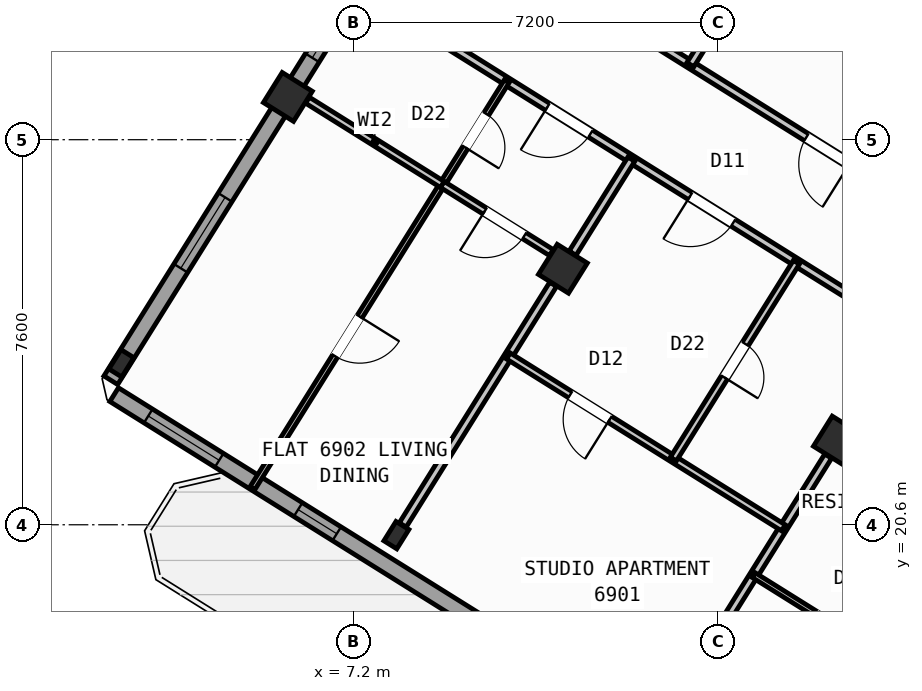
"""IFC4 building model, lengths in metres.
Left out: names, types, materials, properties, quantities, classifications, styles, units other than length and angle.
Written with IfcOpenShell. Run it as: python <this file> out.ifc"""

import sys

from ifc_helpers import new_model, si_unit, direction, frame, frame_2d, origin, origin_2d, place, context, subcontext, project, spatial, rectangle, hollow_rectangle, i_section, extrude, source, transform, mapped, element, fill, save


model = new_model("IFC4")
c1 = context("Model", 3, precision=1e-05, world=origin(), true_north=direction((0.0, 1.0)))
c2 = subcontext(c1, "Body", "Model", "MODEL_VIEW")
j1 = project(units=[si_unit("LENGTHUNIT", "METRE"), si_unit("PLANEANGLEUNIT", "RADIAN")], contexts=[c1])
p1 = place(None, origin())
s1 = spatial("IfcSite", under=j1, at=p1, CompositionType="ELEMENT")
p2 = place(p1, origin())
s2 = spatial("IfcBuilding", under=s1, at=p2, CompositionType="ELEMENT")
p3 = place(p2, frame((0.0, 0.0, 273.6)))
s3 = spatial("IfcBuildingStorey", under=s2, at=p3, CompositionType="ELEMENT", Elevation=273.6)
m1 = source(origin(), c2, "Body", "SweptSolid", [
    extrude(hollow_rectangle(XDim=0.7, YDim=0.7, WallThickness=0.028, at=origin_2d()), origin(), (0.0, 0.0, 1.0), 3.6),
])
for number, where, z_axis, x_axis in (
    (1, (16.764, 22.261, 0.0), (0.0, 0.0, 1.0), (-0.848, 0.53, 0.0)),
    (2, (11.336, 25.653, 0.0), (0.0, 0.0, 1.0), (-0.848, 0.53, 0.0)),
):
    element("IfcColumn", number, at=place(p3, frame(where, z_axis=z_axis, x_axis=x_axis)), inside=s3, PredefinedType="COLUMN", context=c2, shape_type="MappedRepresentation", body=[
        mapped(m1, transform((0.0, 0.0, 0.0), scale=1.0)),
    ])
m2 = source(origin(), c2, "Body", "SweptSolid", [
    extrude(i_section(OverallWidth=0.3, OverallDepth=0.45, WebThickness=0.014, FlangeThickness=0.026, at=origin_2d()), origin(), (0.0, 0.0, 1.0), 3.6),
])
p4 = place(p3, frame((8.051, 20.395, 0.0), z_axis=(0.0, 0.0, 1.0), x_axis=(-0.848048096156, 0.529919264233, 0.0)))
e3 = element("IfcColumn", 3, at=p4, inside=s3, PredefinedType="COLUMN", context=c2, shape_type="MappedRepresentation", body=[
    mapped(m2, transform((0.0, 0.0, 0.0), scale=1.0)),
])
p5 = place(p3, frame((5.909, 29.044, 0.0), z_axis=(0.0, 0.0, 1.0), x_axis=(-0.848048096156, 0.529919264233, 0.0)))
e4 = element("IfcColumn", 4, at=p5, inside=s3, PredefinedType="COLUMN", context=c2, shape_type="MappedRepresentation", body=[
    mapped(m1, transform((0.0, 0.0, 0.0), scale=1.0)),
])
p6 = place(p3, frame((2.623, 23.786, 0.0), z_axis=(0.0, 0.0, 1.0), x_axis=(-0.848048096156, 0.529919264233, 0.0)))
e5 = element("IfcColumn", 5, at=p6, inside=s3, PredefinedType="COLUMN", context=c2, shape_type="MappedRepresentation", body=[
    mapped(m2, transform((0.0, 0.0, 0.0), scale=1.0)),
])
p7 = place(p3, frame((29.268, 6.429, 0.0), z_axis=(0.0, 0.0, 1.0), x_axis=(-0.848049971435, 0.529916263149, 0.0)))
e6 = element("IfcWall", 6, at=p7, inside=s3, PredefinedType="STANDARD", context=c2, shape_type="SweptSolid", body=[
    extrude(rectangle(XDim=31.588, YDim=0.32, at=frame_2d((15.794, 0.0))), origin(), (0.0, 0.0, 1.0), 3.35),
])
p8 = place(p7, frame((16.362, 0.0, 0.0)))
e7 = element("IfcOpeningElement", 7, at=p8, cuts=e6, PredefinedType="OPENING", context=c2, shape_type="SweptSolid", body=[
    extrude(rectangle(XDim=1.2, YDim=2.15, at=frame_2d((0.6, 1.075))), frame((0.0, 0.17, 0.0), z_axis=(0.0, -1.0, 0.0), x_axis=(1.0, 0.0, 0.0)), (0.0, 0.0, 1.0), 0.34),
])
p9 = place(p7, frame((3.859, 0.0, 0.9)))
e8 = element("IfcOpeningElement", 8, at=p9, cuts=e6, PredefinedType="OPENING", context=c2, shape_type="SweptSolid", body=[
    extrude(rectangle(XDim=1.65, YDim=1.45, at=frame_2d((0.825, 0.725))), frame((0.0, 0.17, 0.0), z_axis=(0.0, -1.0, 0.0), x_axis=(1.0, 0.0, 0.0)), (0.0, 0.0, 1.0), 0.34),
])
p10 = place(p7, frame((10.519, 0.0, 0.9)))
e9 = element("IfcOpeningElement", 9, at=p10, cuts=e6, PredefinedType="OPENING", context=c2, shape_type="SweptSolid", body=[
    extrude(rectangle(XDim=1.65, YDim=1.45, at=frame_2d((0.825, 0.725))), frame((0.0, 0.17, 0.0), z_axis=(0.0, -1.0, 0.0), x_axis=(1.0, 0.0, 0.0)), (0.0, 0.0, 1.0), 0.34),
])
p11 = place(p7, frame((21.219, 0.0, 0.95)))
e10 = element("IfcOpeningElement", 10, at=p11, cuts=e6, PredefinedType="OPENING", context=c2, shape_type="SweptSolid", body=[
    extrude(rectangle(XDim=1.95, YDim=1.35, at=frame_2d((0.975, 0.675))), frame((0.0, 0.17, 0.0), z_axis=(0.0, -1.0, 0.0), x_axis=(1.0, 0.0, 0.0)), (0.0, 0.0, 1.0), 0.34),
])
p12 = place(p7, frame((26.406, 0.0, 1.0)))
e11 = element("IfcOpeningElement", 11, at=p12, cuts=e6, PredefinedType="OPENING", context=c2, shape_type="SweptSolid", body=[
    extrude(rectangle(XDim=0.9, YDim=1.25, at=frame_2d((0.45, 0.625))), frame((0.0, 0.17, 0.0), z_axis=(0.0, -1.0, 0.0), x_axis=(1.0, 0.0, 0.0)), (0.0, 0.0, 1.0), 0.34),
])
p13 = place(p7, frame((29.143, 0.0, 0.9)))
e12 = element("IfcOpeningElement", 12, at=p13, cuts=e6, PredefinedType="OPENING", context=c2, shape_type="SweptSolid", body=[
    extrude(rectangle(XDim=1.65, YDim=1.45, at=frame_2d((0.825, 0.725))), frame((0.0, 0.17, 0.0), z_axis=(0.0, -1.0, 0.0), x_axis=(1.0, 0.0, 0.0)), (0.0, 0.0, 1.0), 0.34),
])
p14 = place(p3, frame((2.415, 23.452, 0.0), z_axis=(0.0, 0.0, 1.0), x_axis=(0.52991049553, 0.848053575387, 0.0)))
e13 = element("IfcWall", 13, at=p14, inside=s3, PredefinedType="STANDARD", context=c2, shape_type="SweptSolid", body=[
    extrude(rectangle(XDim=21.587, YDim=0.32, at=frame_2d((10.794, 0.0))), origin(), (0.0, 0.0, 1.0), 2.875),
])
p15 = place(p14, frame((2.606, 0.0, 0.9)))
e14 = element("IfcOpeningElement", 14, at=p15, cuts=e13, PredefinedType="OPENING", context=c2, shape_type="SweptSolid", body=[
    extrude(rectangle(XDim=1.65, YDim=1.45, at=frame_2d((0.825, 0.725))), frame((0.0, 0.17, 0.0), z_axis=(0.0, -1.0, 0.0), x_axis=(1.0, 0.0, 0.0)), (0.0, 0.0, 1.0), 0.34),
])
p16 = place(p14, frame((7.504, 0.0, 1.0)))
e15 = element("IfcOpeningElement", 15, at=p16, cuts=e13, PredefinedType="OPENING", context=c2, shape_type="SweptSolid", body=[
    extrude(rectangle(XDim=0.9, YDim=1.25, at=frame_2d((0.45, 0.625))), frame((0.0, 0.17, 0.0), z_axis=(0.0, -1.0, 0.0), x_axis=(1.0, 0.0, 0.0)), (0.0, 0.0, 1.0), 0.34),
])
p17 = place(p14, frame((12.084, 0.0, 1.0)))
e16 = element("IfcOpeningElement", 16, at=p17, cuts=e13, PredefinedType="OPENING", context=c2, shape_type="SweptSolid", body=[
    extrude(rectangle(XDim=0.9, YDim=1.25, at=frame_2d((0.45, 0.625))), frame((0.0, 0.17, 0.0), z_axis=(0.0, -1.0, 0.0), x_axis=(1.0, 0.0, 0.0)), (0.0, 0.0, 1.0), 0.34),
])
p18 = place(p14, frame((15.619, 0.0, 1.0)))
e17 = element("IfcOpeningElement", 17, at=p18, cuts=e13, PredefinedType="OPENING", context=c2, shape_type="SweptSolid", body=[
    extrude(rectangle(XDim=0.9, YDim=1.25, at=frame_2d((0.45, 0.625))), frame((0.0, 0.17, 0.0), z_axis=(0.0, -1.0, 0.0), x_axis=(1.0, 0.0, 0.0)), (0.0, 0.0, 1.0), 0.34),
])
p19 = place(p14, frame((18.569, 0.0, 1.0)))
e18 = element("IfcOpeningElement", 18, at=p19, cuts=e13, PredefinedType="OPENING", context=c2, shape_type="SweptSolid", body=[
    extrude(rectangle(XDim=0.9, YDim=1.25, at=frame_2d((0.45, 0.625))), frame((0.0, 0.17, 0.0), z_axis=(0.0, -1.0, 0.0), x_axis=(1.0, 0.0, 0.0)), (0.0, 0.0, 1.0), 0.34),
])
p20 = place(p3, frame((14.138, 41.825, 0.0), z_axis=(0.0, 0.0, 1.0), x_axis=(0.848046498049, -0.529921821731, 0.0)))
e19 = element("IfcWall", 19, at=p20, inside=s3, PredefinedType="STANDARD", context=c2, shape_type="SweptSolid", body=[
    extrude(rectangle(XDim=31.588, YDim=0.32, at=frame_2d((15.794, 0.0))), origin(), (0.0, 0.0, 1.0), 3.35),
])
p21 = place(p20, frame((3.46, 0.0, 0.0)))
e20 = element("IfcOpeningElement", 20, at=p21, cuts=e19, PredefinedType="OPENING", context=c2, shape_type="SweptSolid", body=[
    extrude(rectangle(XDim=1.05, YDim=2.15, at=frame_2d((0.525, 1.075))), frame((0.0, 0.17, 0.0), z_axis=(0.0, -1.0, 0.0), x_axis=(1.0, 0.0, 0.0)), (0.0, 0.0, 1.0), 0.34),
])
p22 = place(p20, frame((0.831, 0.0, 1.0)))
e21 = element("IfcOpeningElement", 21, at=p22, cuts=e19, PredefinedType="OPENING", context=c2, shape_type="SweptSolid", body=[
    extrude(rectangle(XDim=0.9, YDim=1.25, at=frame_2d((0.45, 0.625))), frame((0.0, 0.17, 0.0), z_axis=(0.0, -1.0, 0.0), x_axis=(1.0, 0.0, 0.0)), (0.0, 0.0, 1.0), 0.34),
])
p23 = place(p20, frame((8.719, 0.0, 0.9)))
e22 = element("IfcOpeningElement", 22, at=p23, cuts=e19, PredefinedType="OPENING", context=c2, shape_type="SweptSolid", body=[
    extrude(rectangle(XDim=1.35, YDim=1.45, at=frame_2d((0.675, 0.725))), frame((0.0, 0.17, 0.0), z_axis=(0.0, -1.0, 0.0), x_axis=(1.0, 0.0, 0.0)), (0.0, 0.0, 1.0), 0.34),
])
p24 = place(p20, frame((13.599, 0.0, 0.95)))
e23 = element("IfcOpeningElement", 23, at=p24, cuts=e19, PredefinedType="OPENING", context=c2, shape_type="SweptSolid", body=[
    extrude(rectangle(XDim=1.95, YDim=1.35, at=frame_2d((0.975, 0.675))), frame((0.0, 0.17, 0.0), z_axis=(0.0, -1.0, 0.0), x_axis=(1.0, 0.0, 0.0)), (0.0, 0.0, 1.0), 0.34),
])
p25 = place(p20, frame((17.154, 0.0, 1.0)))
e24 = element("IfcOpeningElement", 24, at=p25, cuts=e19, PredefinedType="OPENING", context=c2, shape_type="SweptSolid", body=[
    extrude(rectangle(XDim=0.9, YDim=1.25, at=frame_2d((0.45, 0.625))), frame((0.0, 0.17, 0.0), z_axis=(0.0, -1.0, 0.0), x_axis=(1.0, 0.0, 0.0)), (0.0, 0.0, 1.0), 0.34),
])
p26 = place(p20, frame((21.719, 0.0, 0.9)))
e25 = element("IfcOpeningElement", 25, at=p26, cuts=e19, PredefinedType="OPENING", context=c2, shape_type="SweptSolid", body=[
    extrude(rectangle(XDim=1.65, YDim=1.45, at=frame_2d((0.825, 0.725))), frame((0.0, 0.17, 0.0), z_axis=(0.0, -1.0, 0.0), x_axis=(1.0, 0.0, 0.0)), (0.0, 0.0, 1.0), 0.34),
])
p27 = place(p20, frame((27.419, 0.0, 0.9)))
e26 = element("IfcOpeningElement", 26, at=p27, cuts=e19, PredefinedType="OPENING", context=c2, shape_type="SweptSolid", body=[
    extrude(rectangle(XDim=1.65, YDim=1.45, at=frame_2d((0.825, 0.725))), frame((0.0, 0.17, 0.0), z_axis=(0.0, -1.0, 0.0), x_axis=(1.0, 0.0, 0.0)), (0.0, 0.0, 1.0), 0.34),
])
p28 = place(p3, frame((21.329, 22.416, 0.0), z_axis=(0.0, 0.0, 1.0), x_axis=(-0.529920220799, -0.848047498427, 0.0)))
e27 = element("IfcWall", 27, at=p28, inside=s3, PredefinedType="PARTITIONING", context=c2, shape_type="SweptSolid", body=[
    extrude(rectangle(XDim=9.2, YDim=0.16, at=frame_2d((4.6, 0.0))), origin(), (0.0, 0.0, 1.0), 3.34),
])
p29 = place(p3, frame((22.495, 24.281, 0.0), z_axis=(0.0, 0.0, 1.0), x_axis=(-0.848052408131, 0.529912363569, 0.0)))
e28 = element("IfcWall", 28, at=p29, inside=s3, PredefinedType="PARTITIONING", context=c2, shape_type="SweptSolid", body=[
    extrude(rectangle(XDim=16.73, YDim=0.16, at=frame_2d((8.365, 0.0))), origin(), (0.0, 0.0, 1.0), 3.34),
])
p30 = place(p29, frame((2.22, 0.0, 0.0)))
e29 = element("IfcOpeningElement", 29, at=p30, cuts=e28, PredefinedType="OPENING", context=c2, shape_type="SweptSolid", body=[
    extrude(rectangle(XDim=0.86, YDim=2.05, at=frame_2d((0.43, 1.025))), frame((0.0, 0.09, 0.0), z_axis=(0.0, -1.0, 0.0), x_axis=(1.0, 0.0, 0.0)), (0.0, 0.0, 1.0), 0.18),
])
p31 = place(p29, frame((6.49, 0.0, 0.0)))
e30 = element("IfcOpeningElement", 30, at=p31, cuts=e28, PredefinedType="OPENING", context=c2, shape_type="SweptSolid", body=[
    extrude(rectangle(XDim=1.0, YDim=2.1, at=frame_2d((0.5, 1.05))), frame((0.0, 0.09, 0.0), z_axis=(0.0, -1.0, 0.0), x_axis=(1.0, 0.0, 0.0)), (0.0, 0.0, 1.0), 0.18),
])
p32 = place(p29, frame((14.76, 0.0, 0.0)))
e31 = element("IfcOpeningElement", 31, at=p32, cuts=e28, PredefinedType="OPENING", context=c2, shape_type="SweptSolid", body=[
    extrude(rectangle(XDim=1.0, YDim=2.1, at=frame_2d((0.5, 1.05))), frame((0.0, 0.09, 0.0), z_axis=(0.0, -1.0, 0.0), x_axis=(1.0, 0.0, 0.0)), (0.0, 0.0, 1.0), 0.18),
])
p33 = place(p3, frame((21.329, 22.416, 0.0), z_axis=(0.0, 0.0, 1.0), x_axis=(-0.848052408131, 0.529912363569, 0.0)))
e32 = element("IfcWall", 32, at=p33, inside=s3, PredefinedType="PARTITIONING", context=c2, shape_type="SweptSolid", body=[
    extrude(rectangle(XDim=16.73, YDim=0.16, at=frame_2d((8.365, 0.0))), origin(), (0.0, 0.0, 1.0), 3.34),
])
p34 = place(p33, frame((1.395, 0.0, 0.0)))
e33 = element("IfcOpeningElement", 33, at=p34, cuts=e32, PredefinedType="OPENING", context=c2, shape_type="SweptSolid", body=[
    extrude(rectangle(XDim=1.0, YDim=2.1, at=frame_2d((0.5, 1.05))), frame((0.0, 0.09, 0.0), z_axis=(0.0, -1.0, 0.0), x_axis=(1.0, 0.0, 0.0)), (0.0, 0.0, 1.0), 0.18),
])
p35 = place(p33, frame((7.82, 0.0, 0.0)))
e34 = element("IfcOpeningElement", 34, at=p35, cuts=e32, PredefinedType="OPENING", context=c2, shape_type="SweptSolid", body=[
    extrude(rectangle(XDim=1.0, YDim=2.1, at=frame_2d((0.5, 1.05))), frame((0.0, 0.09, 0.0), z_axis=(0.0, -1.0, 0.0), x_axis=(1.0, 0.0, 0.0)), (0.0, 0.0, 1.0), 0.18),
])
p36 = place(p33, frame((11.14, 0.0, 0.0)))
e35 = element("IfcOpeningElement", 35, at=p36, cuts=e32, PredefinedType="OPENING", context=c2, shape_type="SweptSolid", body=[
    extrude(rectangle(XDim=1.0, YDim=2.1, at=frame_2d((0.5, 1.05))), frame((0.0, 0.09, 0.0), z_axis=(0.0, -1.0, 0.0), x_axis=(1.0, 0.0, 0.0)), (0.0, 0.0, 1.0), 0.18),
])
p37 = place(p3, frame((16.572, 21.954, 0.0), z_axis=(0.0, 0.0, 1.0), x_axis=(-0.529904903214, -0.848057069748, 0.0)))
e36 = element("IfcWall", 36, at=p37, inside=s3, PredefinedType="PARTITIONING", context=c2, shape_type="SweptSolid", body=[
    extrude(rectangle(XDim=5.601, YDim=0.16, at=frame_2d((2.801, 0.0))), origin(), (0.0, 0.0, 1.0), 2.875),
])
p38 = place(p3, frame((18.318, 17.597, 0.0), z_axis=(0.0, 0.0, 1.0), x_axis=(-0.848059820872, 0.529900500304, 0.0)))
e37 = element("IfcWall", 37, at=p38, inside=s3, PredefinedType="PARTITIONING", context=c2, shape_type="SweptSolid", body=[
    extrude(rectangle(XDim=3.79, YDim=0.11, at=frame_2d((1.895, 0.0))), origin(), (0.0, 0.0, 1.0), 3.34),
])
p39 = place(p38, frame((1.435, 0.0, 0.0)))
e38 = element("IfcOpeningElement", 38, at=p39, cuts=e37, PredefinedType="OPENING", context=c2, shape_type="SweptSolid", body=[
    extrude(rectangle(XDim=0.92, YDim=2.08, at=frame_2d((0.46, 1.04))), frame((0.0, 0.065, 0.0), z_axis=(0.0, -1.0, 0.0), x_axis=(1.0, 0.0, 0.0)), (0.0, 0.0, 1.0), 0.13),
])
p40 = place(p3, frame((12.688, 27.815, 0.0), z_axis=(0.0, 0.0, 1.0), x_axis=(-0.52994879608, -0.848029641896, 0.0)))
e39 = element("IfcWall", 39, at=p40, inside=s3, PredefinedType="PARTITIONING", context=c2, shape_type="SweptSolid", body=[
    extrude(rectangle(XDim=2.188, YDim=0.16, at=frame_2d((1.094, 0.0))), origin(), (0.0, 0.0, 1.0), 2.875),
])
p41 = place(p3, frame((11.144, 25.346, 0.0), z_axis=(0.0, 0.0, 1.0), x_axis=(-0.529904903214, -0.848057069748, 0.0)))
e40 = element("IfcWall", 40, at=p41, inside=s3, PredefinedType="PARTITIONING", context=c2, shape_type="SweptSolid", body=[
    extrude(rectangle(XDim=5.601, YDim=0.16, at=frame_2d((2.801, 0.0))), origin(), (0.0, 0.0, 1.0), 2.875),
])
p42 = place(p3, frame((15.688, 20.54, 0.0), z_axis=(0.0, 0.0, 1.0), x_axis=(-0.848049732085, 0.529916646191, 0.0)))
e41 = element("IfcWall", 41, at=p42, inside=s3, PredefinedType="PLUMBINGWALL", context=c2, shape_type="SweptSolid", body=[
    extrude(rectangle(XDim=6.4, YDim=0.14, at=frame_2d((3.2, 0.0))), origin(), (0.0, 0.0, 1.0), 3.34),
])
p43 = place(p42, frame((4.04, 0.0, 0.0)))
e42 = element("IfcOpeningElement", 42, at=p43, cuts=e41, PredefinedType="OPENING", context=c2, shape_type="SweptSolid", body=[
    extrude(rectangle(XDim=0.92, YDim=2.08, at=frame_2d((0.46, 1.04))), frame((0.0, 0.08, 0.0), z_axis=(0.0, -1.0, 0.0), x_axis=(1.0, 0.0, 0.0)), (0.0, 0.0, 1.0), 0.16),
])
p44 = place(p3, frame((15.944, 25.781, 0.0), z_axis=(0.0, 0.0, 1.0), x_axis=(-0.529917480809, -0.848049210561, 0.0)))
e43 = element("IfcWall", 43, at=p44, inside=s3, PredefinedType="PLUMBINGWALL", context=c2, shape_type="SweptSolid", body=[
    extrude(rectangle(XDim=4.58, YDim=0.14, at=frame_2d((2.29, 0.0))), origin(), (0.0, 0.0, 1.0), 3.34),
])
p45 = place(p44, frame((1.9, 0.0, 0.0)))
e44 = element("IfcOpeningElement", 44, at=p45, cuts=e43, PredefinedType="OPENING", context=c2, shape_type="SweptSolid", body=[
    extrude(rectangle(XDim=0.78, YDim=2.05, at=frame_2d((0.39, 1.025))), frame((0.0, 0.08, 0.0), z_axis=(0.0, -1.0, 0.0), x_axis=(1.0, 0.0, 0.0)), (0.0, 0.0, 1.0), 0.16),
])
p46 = place(p3, frame((10.228, 29.352, 0.0), z_axis=(0.0, 0.0, 1.0), x_axis=(-0.529917830441, -0.848048992088, 0.0)))
e45 = element("IfcWall", 45, at=p46, inside=s3, PredefinedType="PARTITIONING", context=c2, shape_type="SweptSolid", body=[
    extrude(rectangle(XDim=9.47, YDim=0.11, at=frame_2d((4.735, 0.0))), origin(), (0.0, 0.0, 1.0), 3.34),
])
p47 = place(p46, frame((0.76, 0.0, 0.0)))
e46 = element("IfcOpeningElement", 46, at=p47, cuts=e45, PredefinedType="OPENING", context=c2, shape_type="SweptSolid", body=[
    extrude(rectangle(XDim=0.78, YDim=2.05, at=frame_2d((0.39, 1.025))), frame((0.0, 0.065, 0.0), z_axis=(0.0, -1.0, 0.0), x_axis=(1.0, 0.0, 0.0)), (0.0, 0.0, 1.0), 0.13),
])
p48 = place(p46, frame((5.475, 0.0, 0.0)))
e47 = element("IfcOpeningElement", 47, at=p48, cuts=e45, PredefinedType="OPENING", context=c2, shape_type="SweptSolid", body=[
    extrude(rectangle(XDim=0.92, YDim=2.08, at=frame_2d((0.46, 1.04))), frame((0.0, 0.065, 0.0), z_axis=(0.0, -1.0, 0.0), x_axis=(1.0, 0.0, 0.0)), (0.0, 0.0, 1.0), 0.13),
])
p49 = place(p3, frame((11.109, 25.972, 0.0), z_axis=(0.0, 0.0, 1.0), x_axis=(-0.848041534199, 0.529929765415, 0.0)))
e48 = element("IfcWall", 48, at=p49, inside=s3, PredefinedType="PLUMBINGWALL", context=c2, shape_type="SweptSolid", body=[
    extrude(rectangle(XDim=2.538, YDim=0.14, at=frame_2d((1.269, 0.0))), origin(), (0.0, 0.0, 1.0), 2.875),
])
p50 = place(p49, frame((0.628, 0.0, 0.0)))
e49 = element("IfcOpeningElement", 49, at=p50, cuts=e48, PredefinedType="OPENING", context=c2, shape_type="SweptSolid", body=[
    extrude(rectangle(XDim=0.92, YDim=2.08, at=frame_2d((0.46, 1.04))), frame((0.0, 0.08, 0.0), z_axis=(0.0, -1.0, 0.0), x_axis=(1.0, 0.0, 0.0)), (0.0, 0.0, 1.0), 0.16),
])
p51 = place(p3, frame((8.956, 27.317, 0.0), z_axis=(0.0, 0.0, 1.0), x_axis=(-0.848050751193, 0.529915015264, 0.0)))
e50 = element("IfcWall", 50, at=p51, inside=s3, PredefinedType="PLUMBINGWALL", context=c2, shape_type="SweptSolid", body=[
    extrude(rectangle(XDim=3.138, YDim=0.14, at=frame_2d((1.569, 0.0))), origin(), (0.0, 0.0, 1.0), 2.875),
])
p52 = place(p3, frame((15.013, 31.537, 0.0), z_axis=(0.0, 0.0, 1.0), x_axis=(-0.5299186965, -0.848048450915, 0.0)))
e51 = element("IfcWall", 51, at=p52, inside=s3, PredefinedType="PARTITIONING", context=c2, shape_type="SweptSolid", body=[
    extrude(rectangle(XDim=2.188, YDim=0.16, at=frame_2d((1.094, 0.0))), origin(), (0.0, 0.0, 1.0), 2.875),
])
m3 = source(origin(), c2, "Body", "SweptSolid", [
    extrude(rectangle(XDim=0.9, YDim=1.25, at=frame_2d((0.45, 0.625))), frame((0.0, 0.03, 0.0), z_axis=(0.0, -1.0, 0.0), x_axis=(1.0, 0.0, 0.0)), (0.0, 0.0, 1.0), 0.06),
])
p53 = place(p12, origin())
e52 = element("IfcWindow", 52, at=p53, inside=s3, PartitioningType="SINGLE_PANEL", PredefinedType="WINDOW", context=c2, shape_type="MappedRepresentation", body=[
    mapped(m3, transform((0.0, 0.0, 0.0), scale=1.0)),
])
fill(e11, e52)
m4 = source(origin(), c2, "Body", "SweptSolid", [
    extrude(rectangle(XDim=1.65, YDim=1.45, at=frame_2d((0.825, 0.725))), frame((0.0, 0.03, 0.0), z_axis=(0.0, -1.0, 0.0), x_axis=(1.0, 0.0, 0.0)), (0.0, 0.0, 1.0), 0.06),
])
p54 = place(p13, origin())
e53 = element("IfcWindow", 53, at=p54, inside=s3, PartitioningType="SINGLE_PANEL", PredefinedType="WINDOW", context=c2, shape_type="MappedRepresentation", body=[
    mapped(m4, transform((0.0, 0.0, 0.0), scale=1.0)),
])
fill(e12, e53)
p55 = place(p15, origin())
e54 = element("IfcWindow", 54, at=p55, inside=s3, PartitioningType="SINGLE_PANEL", PredefinedType="WINDOW", context=c2, shape_type="MappedRepresentation", body=[
    mapped(m4, transform((0.0, 0.0, 0.0), scale=1.0)),
])
fill(e14, e54)
p56 = place(p16, origin())
e55 = element("IfcWindow", 55, at=p56, inside=s3, PartitioningType="SINGLE_PANEL", PredefinedType="WINDOW", context=c2, shape_type="MappedRepresentation", body=[
    mapped(m3, transform((0.0, 0.0, 0.0), scale=1.0)),
])
fill(e15, e55)
m5 = source(origin(), c2, "Body", "SweptSolid", [
    extrude(rectangle(XDim=1.0, YDim=2.1, at=frame_2d((0.5, 1.05))), frame((0.0, 0.025, 0.0), z_axis=(0.0, -1.0, 0.0), x_axis=(1.0, 0.0, 0.0)), (0.0, 0.0, 1.0), 0.05),
])
p57 = place(p35, origin())
e56 = element("IfcDoor", 56, at=p57, inside=s3, OperationType="SINGLE_SWING_RIGHT", PredefinedType="DOOR", context=c2, shape_type="MappedRepresentation", body=[
    mapped(m5, transform((0.0, 0.0, 0.0), scale=1.0)),
])
fill(e34, e56)
m6 = source(origin(), c2, "Body", "SweptSolid", [
    extrude(rectangle(XDim=0.92, YDim=2.08, at=frame_2d((0.46, 1.04))), frame((0.0, 0.025, 0.0), z_axis=(0.0, -1.0, 0.0), x_axis=(1.0, 0.0, 0.0)), (0.0, 0.0, 1.0), 0.05),
])
p58 = place(p43, origin())
e57 = element("IfcDoor", 57, at=p58, inside=s3, OperationType="SINGLE_SWING_LEFT", PredefinedType="DOOR", context=c2, shape_type="MappedRepresentation", body=[
    mapped(m6, transform((0.0, 0.0, 0.0), scale=1.0)),
])
fill(e42, e57)
m7 = source(origin(), c2, "Body", "SweptSolid", [
    extrude(rectangle(XDim=0.78, YDim=2.05, at=frame_2d((0.39, 1.025))), frame((0.0, 0.025, 0.0), z_axis=(0.0, -1.0, 0.0), x_axis=(1.0, 0.0, 0.0)), (0.0, 0.0, 1.0), 0.05),
])
p59 = place(p45, origin())
e58 = element("IfcDoor", 58, at=p59, inside=s3, OperationType="SINGLE_SWING_RIGHT", PredefinedType="DOOR", context=c2, shape_type="MappedRepresentation", body=[
    mapped(m7, transform((0.0, 0.0, 0.0), scale=1.0)),
])
fill(e44, e58)
p60 = place(p36, origin())
e59 = element("IfcDoor", 59, at=p60, inside=s3, OperationType="SINGLE_SWING_RIGHT", PredefinedType="DOOR", context=c2, shape_type="MappedRepresentation", body=[
    mapped(m5, transform((0.0, 0.0, 0.0), scale=1.0)),
])
fill(e35, e59)
p61 = place(p50, origin())
e60 = element("IfcDoor", 60, at=p61, inside=s3, OperationType="SINGLE_SWING_RIGHT", PredefinedType="DOOR", context=c2, shape_type="MappedRepresentation", body=[
    mapped(m6, transform((0.0, 0.0, 0.0), scale=1.0)),
])
fill(e49, e60)
p62 = place(p47, origin())
e61 = element("IfcDoor", 61, at=p62, inside=s3, OperationType="SINGLE_SWING_RIGHT", PredefinedType="DOOR", context=c2, shape_type="MappedRepresentation", body=[
    mapped(m7, transform((0.0, 0.0, 0.0), scale=1.0)),
])
fill(e46, e61)
p63 = place(p48, origin())
e62 = element("IfcDoor", 62, at=p63, inside=s3, OperationType="SINGLE_SWING_LEFT", PredefinedType="DOOR", context=c2, shape_type="MappedRepresentation", body=[
    mapped(m6, transform((0.0, 0.0, 0.0), scale=1.0)),
])
fill(e47, e62)
p64 = place(p31, origin())
e63 = element("IfcDoor", 63, at=p64, inside=s3, OperationType="SINGLE_SWING_LEFT", PredefinedType="DOOR", context=c2, shape_type="MappedRepresentation", body=[
    mapped(m5, transform((0.0, 0.0, 0.0), scale=1.0)),
])
fill(e30, e63)
save(model, sys.argv[1])
